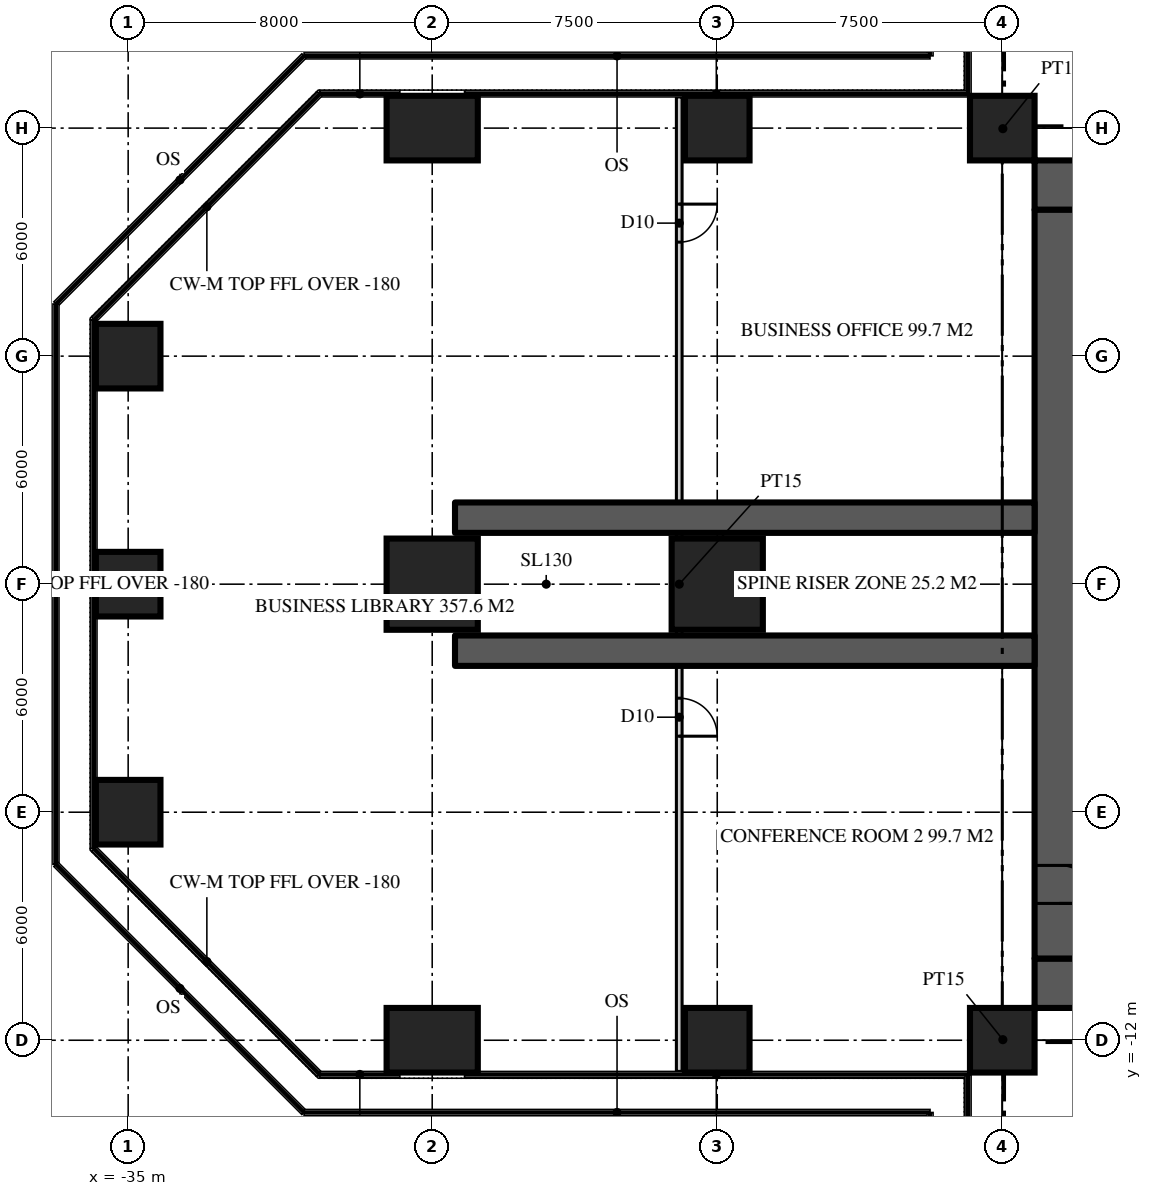
"""IFC4 building model, lengths in metres.
Left out: names, types, materials, properties, quantities, classifications, styles, units other than length and angle.
Written with IfcOpenShell. Run it as: python <this file> out.ifc"""

import sys

from ifc_helpers import new_model, si_unit, direction, frame, frame_2d, origin, origin_2d, place, context, subcontext, project, spatial, rectangle, extrude, element, fill, save


model = new_model("IFC4")
c1 = context("Model", 3, precision=1e-05, world=origin(), true_north=direction((0.0, 1.0)))
c2 = subcontext(c1, "Body", "Model", "MODEL_VIEW")
j1 = project(units=[si_unit("LENGTHUNIT", "METRE"), si_unit("PLANEANGLEUNIT", "RADIAN")], contexts=[c1])
p1 = place(None, origin())
s1 = spatial("IfcSite", under=j1, at=p1, CompositionType="ELEMENT")
p2 = place(p1, origin())
s2 = spatial("IfcBuilding", under=s1, at=p2, CompositionType="ELEMENT")
p3 = place(p2, frame((0.0, 0.0, 113.7)))
s3 = spatial("IfcBuildingStorey", under=s2, at=p3, CompositionType="ELEMENT", Elevation=113.7)
p4 = place(p3, frame((-11.15, 10.5, 0.0), z_axis=(0.0, 0.0, 1.0), x_axis=(1.0, 0.0, 0.0)))
e1 = element("IfcWall", 1, at=p4, inside=s3, PredefinedType="SHEAR", context=c2, shape_type="SweptSolid", body=[
    extrude(rectangle(XDim=22.3, YDim=1.3, at=frame_2d((11.15, 0.0))), origin(), (0.0, 0.0, 1.0), 4.5),
])
p5 = place(p4, frame((4.25, 0.0, 0.0)))
e2 = element("IfcOpeningElement", 2, at=p5, cuts=e1, PredefinedType="OPENING", context=c2, shape_type="SweptSolid", body=[
    extrude(rectangle(XDim=1.8, YDim=2.2, at=frame_2d((0.9, 1.1))), frame((0.0, 0.66, 0.0), z_axis=(0.0, -1.0, 0.0), x_axis=(1.0, 0.0, 0.0)), (0.0, 0.0, 1.0), 1.32),
])
p6 = place(p4, frame((16.25, 0.0, 0.0)))
e3 = element("IfcOpeningElement", 3, at=p6, cuts=e1, PredefinedType="OPENING", context=c2, shape_type="SweptSolid", body=[
    extrude(rectangle(XDim=1.8, YDim=2.2, at=frame_2d((0.9, 1.1))), frame((0.0, 0.66, 0.0), z_axis=(0.0, -1.0, 0.0), x_axis=(1.0, 0.0, 0.0)), (0.0, 0.0, 1.0), 1.32),
])
p7 = place(p3, frame((11.15, -10.5, 0.0), z_axis=(0.0, 0.0, 1.0), x_axis=(-1.0, 0.0, 0.0)))
e4 = element("IfcWall", 4, at=p7, inside=s3, PredefinedType="SHEAR", context=c2, shape_type="SweptSolid", body=[
    extrude(rectangle(XDim=22.3, YDim=1.3, at=frame_2d((11.15, 0.0))), origin(), (0.0, 0.0, 1.0), 4.5),
])
p8 = place(p7, frame((16.25, 0.0, 0.0)))
e5 = element("IfcOpeningElement", 5, at=p8, cuts=e4, PredefinedType="OPENING", context=c2, shape_type="SweptSolid", body=[
    extrude(rectangle(XDim=1.8, YDim=2.2, at=frame_2d((0.9, 1.1))), frame((0.0, 0.66, 0.0), z_axis=(0.0, -1.0, 0.0), x_axis=(1.0, 0.0, 0.0)), (0.0, 0.0, 1.0), 1.32),
])
p9 = place(p7, frame((4.25, 0.0, 0.0)))
e6 = element("IfcOpeningElement", 6, at=p9, cuts=e4, PredefinedType="OPENING", context=c2, shape_type="SweptSolid", body=[
    extrude(rectangle(XDim=1.8, YDim=2.2, at=frame_2d((0.9, 1.1))), frame((0.0, 0.66, 0.0), z_axis=(0.0, -1.0, 0.0), x_axis=(1.0, 0.0, 0.0)), (0.0, 0.0, 1.0), 1.32),
])
p10 = place(p3, frame((-10.5, 9.85, 0.0), z_axis=(0.0, 0.0, 1.0), x_axis=(0.0, -1.0, 0.0)))
e7 = element("IfcWall", 7, at=p10, inside=s3, PredefinedType="SHEAR", context=c2, shape_type="SweptSolid", body=[
    extrude(rectangle(XDim=19.7, YDim=1.3, at=frame_2d((9.85, 0.0))), origin(), (0.0, 0.0, 1.0), 4.5),
])
p11 = place(p10, frame((17.25, 0.0, 0.0)))
e8 = element("IfcOpeningElement", 8, at=p11, cuts=e7, PredefinedType="OPENING", context=c2, shape_type="SweptSolid", body=[
    extrude(rectangle(XDim=1.0, YDim=2.2, at=frame_2d((0.5, 1.1))), frame((0.0, 0.66, 0.0), z_axis=(0.0, -1.0, 0.0), x_axis=(1.0, 0.0, 0.0)), (0.0, 0.0, 1.0), 1.32),
])
for number, where, z_axis, x_axis in (
    (9, (-11.15, 1.75, 0.0), (0.0, 0.0, 1.0), (-1.0, 0.0, 0.0)),
    (10, (-11.15, -1.75, 0.0), (0.0, 0.0, 1.0), (-1.0, 0.0, 0.0)),
):
    element("IfcWall", number, at=place(p3, frame(where, z_axis=z_axis, x_axis=x_axis)), inside=s3, PredefinedType="SHEAR", context=c2, shape_type="SweptSolid", body=[
        extrude(rectangle(XDim=15.25, YDim=0.8, at=frame_2d((7.625, 0.0))), origin(), (0.0, 0.0, 1.0), 4.5),
    ])
p12 = place(p3, frame((-27.0, -12.0, 0.0), z_axis=(0.0, 0.0, 1.0), x_axis=(0.0, 1.0, 0.0)))
e11 = element("IfcColumn", 11, at=p12, inside=s3, PredefinedType="COLUMN", context=c2, shape_type="SweptSolid", body=[
    extrude(rectangle(XDim=1.7, YDim=2.4, at=origin_2d()), origin(), (0.0, 0.0, 1.0), 4.5),
])
for number, where, z_axis, x_axis in (
    (12, (-19.5, -12.0, 0.0), (0.0, 0.0, 1.0), (1.0, 0.0, 0.0)),
    (13, (-12.0, -12.0, 0.0), (0.0, 0.0, 1.0), (1.0, 0.0, 0.0)),
    (14, (-35.0, -6.0, 0.0), (0.0, 0.0, 1.0), (1.0, 0.0, 0.0)),
    (15, (-35.0, 0.0, 0.0), (0.0, 0.0, 1.0), (1.0, 0.0, 0.0)),
):
    element("IfcColumn", number, at=place(p3, frame(where, z_axis=z_axis, x_axis=x_axis)), inside=s3, PredefinedType="COLUMN", context=c2, shape_type="SweptSolid", body=[
        extrude(rectangle(XDim=1.7, YDim=1.7, at=origin_2d()), origin(), (0.0, 0.0, 1.0), 4.5),
    ])
for number, where, z_axis, x_axis in (
    (16, (-27.0, 0.0, 0.0), (0.0, 0.0, 1.0), (1.0, 0.0, 0.0)),
    (17, (-19.5, 0.0, 0.0), (0.0, 0.0, 1.0), (1.0, 0.0, 0.0)),
):
    element("IfcColumn", number, at=place(p3, frame(where, z_axis=z_axis, x_axis=x_axis)), inside=s3, PredefinedType="COLUMN", context=c2, shape_type="SweptSolid", body=[
        extrude(rectangle(XDim=2.4, YDim=2.4, at=origin_2d()), origin(), (0.0, 0.0, 1.0), 4.5),
    ])
p13 = place(p3, frame((-35.0, 6.0, 0.0), z_axis=(0.0, 0.0, 1.0), x_axis=(1.0, 0.0, 0.0)))
e18 = element("IfcColumn", 18, at=p13, inside=s3, PredefinedType="COLUMN", context=c2, shape_type="SweptSolid", body=[
    extrude(rectangle(XDim=1.7, YDim=1.7, at=origin_2d()), origin(), (0.0, 0.0, 1.0), 4.5),
])
p14 = place(p3, frame((-27.0, 12.0, 0.0), z_axis=(0.0, 0.0, 1.0), x_axis=(0.0, 1.0, 0.0)))
e19 = element("IfcColumn", 19, at=p14, inside=s3, PredefinedType="COLUMN", context=c2, shape_type="SweptSolid", body=[
    extrude(rectangle(XDim=1.7, YDim=2.4, at=origin_2d()), origin(), (0.0, 0.0, 1.0), 4.5),
])
for number, where, z_axis, x_axis in (
    (20, (-19.5, 12.0, 0.0), (0.0, 0.0, 1.0), (1.0, 0.0, 0.0)),
    (21, (-12.0, 12.0, 0.0), (0.0, 0.0, 1.0), (1.0, 0.0, 0.0)),
):
    element("IfcColumn", number, at=place(p3, frame(where, z_axis=z_axis, x_axis=x_axis)), inside=s3, PredefinedType="COLUMN", context=c2, shape_type="SweptSolid", body=[
        extrude(rectangle(XDim=1.7, YDim=1.7, at=origin_2d()), origin(), (0.0, 0.0, 1.0), 4.5),
    ])
p15 = place(p3, frame((-20.5, 12.82, 0.0), z_axis=(0.0, 0.0, 1.0), x_axis=(0.0, -1.0, 0.0)))
e22 = element("IfcWall", 22, at=p15, inside=s3, PredefinedType="PARTITIONING", context=c2, shape_type="SweptSolid", body=[
    extrude(rectangle(XDim=25.64, YDim=0.15, at=frame_2d((12.82, 0.0))), origin(), (0.0, 0.0, 1.0), 4.32),
])
p16 = place(p15, frame((15.82, 0.0, 0.0)))
e23 = element("IfcOpeningElement", 23, at=p16, cuts=e22, PredefinedType="OPENING", context=c2, shape_type="SweptSolid", body=[
    extrude(rectangle(XDim=1.0, YDim=2.2, at=frame_2d((0.5, 1.1))), frame((0.0, 0.085, 0.0), z_axis=(0.0, -1.0, 0.0), x_axis=(1.0, 0.0, 0.0)), (0.0, 0.0, 1.0), 0.17),
])
p17 = place(p15, frame((2.82, 0.0, 0.0)))
e24 = element("IfcOpeningElement", 24, at=p17, cuts=e22, PredefinedType="OPENING", context=c2, shape_type="SweptSolid", body=[
    extrude(rectangle(XDim=1.0, YDim=2.2, at=frame_2d((0.5, 1.1))), frame((0.0, 0.085, 0.0), z_axis=(0.0, -1.0, 0.0), x_axis=(1.0, 0.0, 0.0)), (0.0, 0.0, 1.0), 0.17),
])
for number, where, z_axis, x_axis in (
    (25, (-11.15, 11.15, 0.0), (0.0, 0.0, 1.0), (-0.707, 0.707, 0.0)),
    (26, (-11.15, -11.15, 0.0), (0.0, 0.0, 1.0), (-0.707, -0.707, 0.0)),
):
    element("IfcWall", number, at=place(p3, frame(where, z_axis=z_axis, x_axis=x_axis)), inside=s3, PredefinedType="PARTITIONING", context=c2, shape_type="SweptSolid", body=[
        extrude(rectangle(XDim=2.362, YDim=0.15, at=frame_2d((1.181, 0.0))), origin(), (0.0, 0.0, 1.0), 4.32),
    ])
p18 = place(p11, origin())
e27 = element("IfcDoor", 27, at=p18, inside=s3, OperationType="SINGLE_SWING_RIGHT", PredefinedType="DOOR", context=c2, shape_type="SweptSolid", body=[
    extrude(rectangle(XDim=1.0, YDim=2.2, at=frame_2d((0.5, 1.1))), frame((0.0, 0.025, 0.0), z_axis=(0.0, -1.0, 0.0), x_axis=(1.0, 0.0, 0.0)), (0.0, 0.0, 1.0), 0.05),
])
fill(e8, e27)
p19 = place(p16, origin())
e28 = element("IfcDoor", 28, at=p19, inside=s3, OperationType="SINGLE_SWING_RIGHT", PredefinedType="DOOR", context=c2, shape_type="SweptSolid", body=[
    extrude(rectangle(XDim=1.0, YDim=2.2, at=frame_2d((0.5, 1.1))), frame((0.0, 0.025, 0.0), z_axis=(0.0, -1.0, 0.0), x_axis=(1.0, 0.0, 0.0)), (0.0, 0.0, 1.0), 0.05),
])
fill(e23, e28)
p20 = place(p17, origin())
e29 = element("IfcDoor", 29, at=p20, inside=s3, OperationType="SINGLE_SWING_LEFT", PredefinedType="DOOR", context=c2, shape_type="SweptSolid", body=[
    extrude(rectangle(XDim=1.0, YDim=2.2, at=frame_2d((0.5, 1.1))), frame((0.0, 0.025, 0.0), z_axis=(0.0, -1.0, 0.0), x_axis=(1.0, 0.0, 0.0)), (0.0, 0.0, 1.0), 0.05),
])
fill(e24, e29)
save(model, sys.argv[1])
